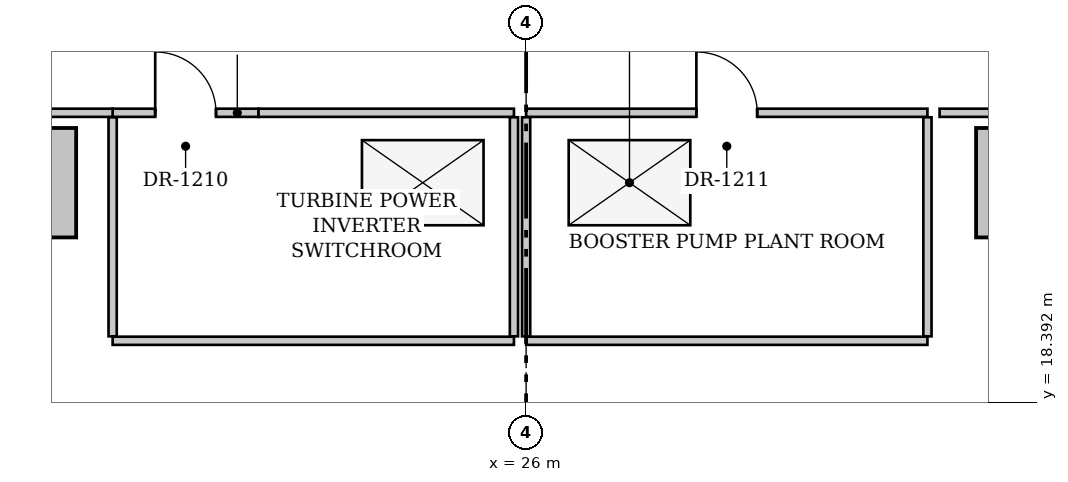
"""IFC4 building model, lengths in metres.
Left out: names, types, materials, properties, quantities, classifications, styles, units other than length and angle.
Written with IfcOpenShell. Run it as: python <this file> out.ifc"""

import sys

from ifc_helpers import new_model, si_unit, direction, frame, frame_2d, origin, origin_2d, place, context, subcontext, project, spatial, rectangle, extrude, source, transform, mapped, element, fill, save


model = new_model("IFC4")
c1 = context("Model", 3, precision=1e-05, world=origin(), true_north=direction((0.0, 1.0)))
c2 = subcontext(c1, "Body", "Model", "MODEL_VIEW")
j1 = project(units=[si_unit("LENGTHUNIT", "METRE"), si_unit("PLANEANGLEUNIT", "RADIAN")], contexts=[c1])
p1 = place(None, origin())
s1 = spatial("IfcSite", under=j1, at=p1, CompositionType="ELEMENT")
p2 = place(p1, origin())
s2 = spatial("IfcBuilding", under=s1, at=p2, CompositionType="ELEMENT")
p3 = place(p2, frame((0.0, 0.0, 202.0)))
s3 = spatial("IfcBuildingStorey", under=s2, at=p3, CompositionType="ELEMENT", Elevation=202.0)
p4 = place(p3, frame((19.2, 23.15, 0.0), z_axis=(0.0, 0.0, 1.0), x_axis=(1.0, 0.0, 0.0)))
e1 = element("IfcWall", 1, at=p4, inside=s3, PredefinedType="PARTITIONING", context=c2, shape_type="SweptSolid", body=[
    extrude(rectangle(XDim=2.4, YDim=0.135, at=frame_2d((1.2, 0.0))), origin(), (0.0, 0.0, 1.0), 5.93),
])
p5 = place(p4, frame((0.7, 0.0, 0.0)))
e2 = element("IfcOpeningElement", 2, at=p5, cuts=e1, PredefinedType="OPENING", context=c2, shape_type="SweptSolid", body=[
    extrude(rectangle(XDim=1.0, YDim=2.15, at=frame_2d((0.5, 1.075))), frame((0.0, 0.078, 0.0), z_axis=(0.0, -1.0, 0.0), x_axis=(1.0, 0.0, 0.0)), (0.0, 0.0, 1.0), 0.155),
])
p6 = place(p3, frame((26.0, 23.15, 0.0), z_axis=(0.0, 0.0, 1.0), x_axis=(1.0, 0.0, 0.0)))
e3 = element("IfcWall", 3, at=p6, inside=s3, PredefinedType="PARTITIONING", context=c2, shape_type="SweptSolid", body=[
    extrude(rectangle(XDim=6.6, YDim=0.135, at=frame_2d((3.3, 0.0))), origin(), (0.0, 0.0, 1.0), 5.93),
])
p7 = place(p6, frame((2.8, 0.0, 0.0)))
e4 = element("IfcOpeningElement", 4, at=p7, cuts=e3, PredefinedType="OPENING", context=c2, shape_type="SweptSolid", body=[
    extrude(rectangle(XDim=1.0, YDim=2.15, at=frame_2d((0.5, 1.075))), frame((0.0, 0.078, 0.0), z_axis=(0.0, -1.0, 0.0), x_axis=(1.0, 0.0, 0.0)), (0.0, 0.0, 1.0), 0.155),
])
p8 = place(p3, frame((21.6, 23.15, 0.0), z_axis=(0.0, 0.0, 1.0), x_axis=(1.0, 0.0, 0.0)))
e5 = element("IfcWall", 5, at=p8, inside=s3, PredefinedType="PARTITIONING", context=c2, shape_type="SweptSolid", body=[
    extrude(rectangle(XDim=4.2, YDim=0.135, at=frame_2d((2.1, 0.0))), origin(), (0.0, 0.0, 1.0), 5.93),
])
p9 = place(p3, frame((19.2, 19.4, 0.0), z_axis=(0.0, 0.0, 1.0), x_axis=(1.0, 0.0, 0.0)))
e6 = element("IfcWall", 6, at=p9, inside=s3, PredefinedType="PARTITIONING", context=c2, shape_type="SweptSolid", body=[
    extrude(rectangle(XDim=6.6, YDim=0.135, at=frame_2d((3.3, 0.0))), origin(), (0.0, 0.0, 1.0), 5.93),
])
p10 = place(p3, frame((19.2, 19.473, 0.0), z_axis=(0.0, 0.0, 1.0), x_axis=(0.0, 1.0, 0.0)))
e7 = element("IfcWall", 7, at=p10, inside=s3, PredefinedType="PARTITIONING", context=c2, shape_type="SweptSolid", body=[
    extrude(rectangle(XDim=3.603, YDim=0.135, at=frame_2d((1.802, 0.0))), origin(), (0.0, 0.0, 1.0), 5.289),
])
p11 = place(p3, frame((25.8, 19.473, 0.0), z_axis=(0.0, 0.0, 1.0), x_axis=(0.0, 1.0, 0.0)))
e8 = element("IfcWall", 8, at=p11, inside=s3, PredefinedType="PARTITIONING", context=c2, shape_type="SweptSolid", body=[
    extrude(rectangle(XDim=3.603, YDim=0.135, at=frame_2d((1.802, 0.0))), origin(), (0.0, 0.0, 1.0), 5.93),
])
p12 = place(p3, frame((26.0, 19.4, 0.0), z_axis=(0.0, 0.0, 1.0), x_axis=(1.0, 0.0, 0.0)))
e9 = element("IfcWall", 9, at=p12, inside=s3, PredefinedType="PARTITIONING", context=c2, shape_type="SweptSolid", body=[
    extrude(rectangle(XDim=6.6, YDim=0.135, at=frame_2d((3.3, 0.0))), origin(), (0.0, 0.0, 1.0), 5.93),
])
p13 = place(p3, frame((26.0, 19.473, 0.0), z_axis=(0.0, 0.0, 1.0), x_axis=(0.0, 1.0, 0.0)))
e10 = element("IfcWall", 10, at=p13, inside=s3, PredefinedType="PARTITIONING", context=c2, shape_type="SweptSolid", body=[
    extrude(rectangle(XDim=3.603, YDim=0.135, at=frame_2d((1.802, 0.0))), origin(), (0.0, 0.0, 1.0), 5.93),
])
p14 = place(p3, frame((32.6, 19.473, 0.0), z_axis=(0.0, 0.0, 1.0), x_axis=(0.0, 1.0, 0.0)))
e11 = element("IfcWall", 11, at=p14, inside=s3, PredefinedType="PARTITIONING", context=c2, shape_type="SweptSolid", body=[
    extrude(rectangle(XDim=3.603, YDim=0.135, at=frame_2d((1.802, 0.0))), origin(), (0.0, 0.0, 1.0), 5.592),
])
for number, where, z_axis, x_axis in (
    (12, (35.527, 23.15, 0.0), (0.0, 0.0, 1.0), (-1.0, 0.0, 0.0)),
    (13, (19.2, 23.15, 0.0), (0.0, 0.0, 1.0), (-1.0, 0.0, 0.0)),
):
    element("IfcWall", number, at=place(p3, frame(where, z_axis=z_axis, x_axis=x_axis)), inside=s3, PredefinedType="PARTITIONING", context=c2, shape_type="SweptSolid", body=[
        extrude(rectangle(XDim=2.727, YDim=0.135, at=frame_2d((1.363, 0.0))), origin(), (0.0, 0.0, 1.0), 5.93),
    ])
p15 = place(p3, frame((0.0, 0.0, -0.35)))
p16 = place(p15, frame((24.3, 22.0, 0.3)))
e14 = element("IfcWindow", 14, at=p16, inside=s3, PartitioningType="SINGLE_PANEL", PredefinedType="SKYLIGHT", context=c2, shape_type="SweptSolid", body=[
    extrude(rectangle(XDim=2.0, YDim=1.4, at=origin_2d()), origin(), (0.0, 0.0, 1.0), 0.05),
])
p17 = place(p15, frame((27.7, 22.0, 0.3)))
e15 = element("IfcWindow", 15, at=p17, inside=s3, PartitioningType="SINGLE_PANEL", PredefinedType="SKYLIGHT", context=c2, shape_type="SweptSolid", body=[
    extrude(rectangle(XDim=2.0, YDim=1.4, at=origin_2d()), origin(), (0.0, 0.0, 1.0), 0.05),
])
m1 = source(origin(), c2, "Body", "SweptSolid", [
    extrude(rectangle(XDim=1.0, YDim=2.15, at=frame_2d((0.5, 1.075))), frame((0.0, 0.025, 0.0), z_axis=(0.0, -1.0, 0.0), x_axis=(1.0, 0.0, 0.0)), (0.0, 0.0, 1.0), 0.05),
])
p18 = place(p5, origin())
e16 = element("IfcDoor", 16, at=p18, inside=s3, OperationType="SINGLE_SWING_LEFT", PredefinedType="DOOR", context=c2, shape_type="MappedRepresentation", body=[
    mapped(m1, transform((0.0, 0.0, 0.0), x_axis=(1.0, 0.0, 0.0), y_axis=(0.0, 1.0, 0.0), z_axis=(0.0, 0.0, 1.0), scale=1.0)),
])
fill(e2, e16)
p19 = place(p7, origin())
e17 = element("IfcDoor", 17, at=p19, inside=s3, OperationType="SINGLE_SWING_LEFT", PredefinedType="DOOR", context=c2, shape_type="MappedRepresentation", body=[
    mapped(m1, transform((0.0, 0.0, 0.0), x_axis=(1.0, 0.0, 0.0), y_axis=(0.0, 1.0, 0.0), z_axis=(0.0, 0.0, 1.0), scale=1.0)),
])
fill(e4, e17)
save(model, sys.argv[1])
